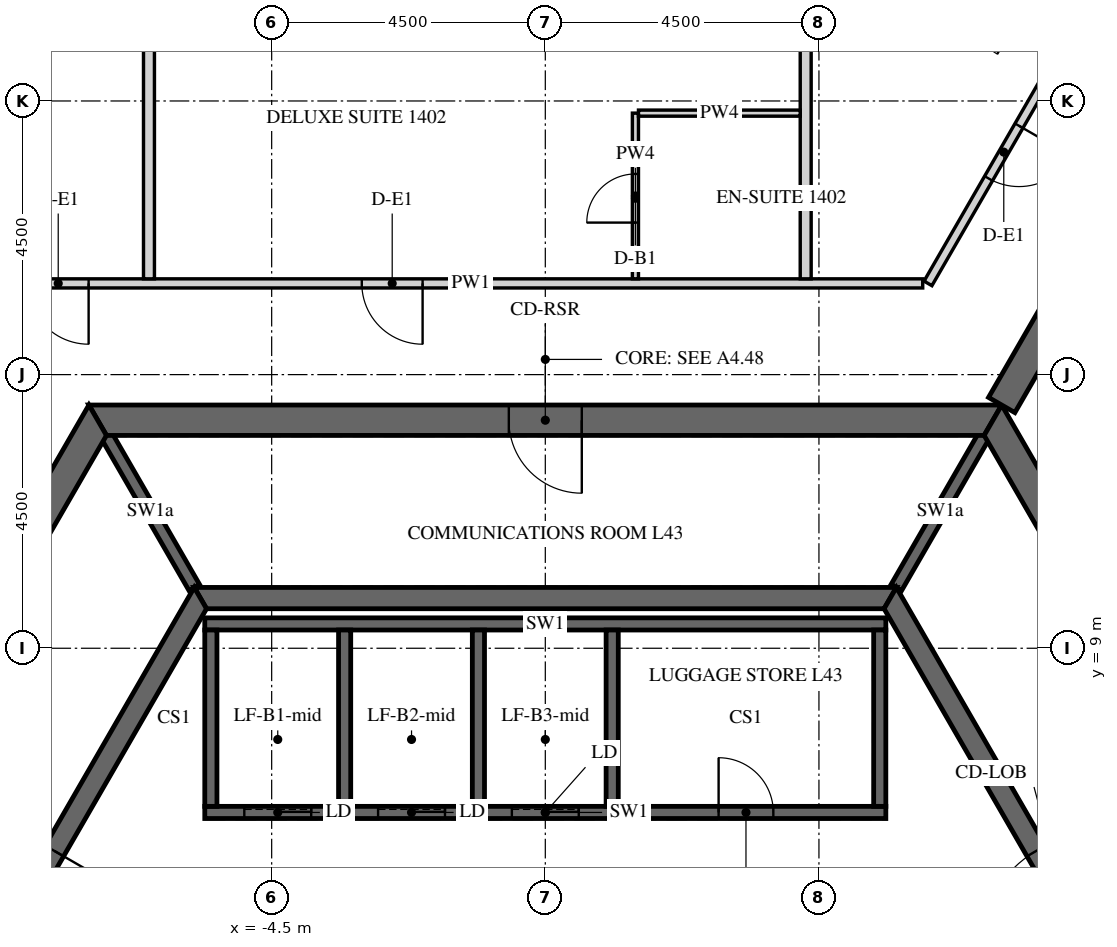
"""IFC4 building model, lengths in metres.
Left out: names, types, materials, properties, quantities, classifications, styles, units other than length and angle.
Written with IfcOpenShell. Run it as: python <this file> out.ifc"""

import sys

from ifc_helpers import new_model, si_unit, direction, frame, frame_2d, origin, place, context, subcontext, project, spatial, polyline, rectangle, outline, extrude, element, fill, save


model = new_model("IFC4")
c1 = context("Model", 3, precision=1e-05, world=origin(), true_north=direction((0.0, 1.0)))
c2 = subcontext(c1, "Body", "Model", "MODEL_VIEW")
j1 = project(units=[si_unit("LENGTHUNIT", "METRE"), si_unit("PLANEANGLEUNIT", "RADIAN")], contexts=[c1])
p1 = place(None, origin())
s1 = spatial("IfcSite", under=j1, at=p1, CompositionType="ELEMENT")
p2 = place(p1, origin())
s2 = spatial("IfcBuilding", under=s1, at=p2, CompositionType="ELEMENT")
p3 = place(p2, frame((0.0, 0.0, 183.9)))
s3 = spatial("IfcBuildingStorey", under=s2, at=p3, CompositionType="ELEMENT", Elevation=183.9)
p4 = place(p3, frame((-7.361, 12.75, -0.15), z_axis=(0.0, 0.0, 1.0), x_axis=(-0.50000571537, -0.866022103989, 0.0)))
e1 = element("IfcWall", 1, at=p4, inside=s3, PredefinedType="SHEAR", context=c2, shape_type="SweptSolid", body=[
    extrude(outline(polyline([(-0.144, -0.25), (14.867, -0.25), (14.578, 0.25), (0.144, 0.25), (-0.144, -0.25)])), origin(), (0.0, 0.0, 1.0), 3.9),
])
p5 = place(p4, frame((6.49, 0.0, 0.15)))
e2 = element("IfcOpeningElement", 2, at=p5, cuts=e1, PredefinedType="OPENING", context=c2, shape_type="SweptSolid", body=[
    extrude(rectangle(XDim=1.8, YDim=2.4, at=frame_2d((0.9, 1.2))), frame((0.0, 0.26, 0.0), z_axis=(0.0, -1.0, 0.0), x_axis=(1.0, 0.0, 0.0)), (0.0, 0.0, 1.0), 0.52),
])
p6 = place(p3, frame((14.722, 0.0, -0.15), z_axis=(0.0, 0.0, 1.0), x_axis=(-0.50000571537, 0.866022103989, 0.0)))
e3 = element("IfcWall", 3, at=p6, inside=s3, PredefinedType="SHEAR", context=c2, shape_type="SweptSolid", body=[
    extrude(outline(polyline([(-0.144, -0.25), (14.867, -0.25), (14.578, 0.25), (0.144, 0.25), (-0.144, -0.25)])), origin(), (0.0, 0.0, 1.0), 3.9),
])
p7 = place(p6, frame((6.432, 0.0, 0.15)))
e4 = element("IfcOpeningElement", 4, at=p7, cuts=e3, PredefinedType="OPENING", context=c2, shape_type="SweptSolid", body=[
    extrude(rectangle(XDim=1.8, YDim=2.4, at=frame_2d((0.9, 1.2))), frame((0.0, 0.26, 0.0), z_axis=(0.0, -1.0, 0.0), x_axis=(1.0, 0.0, 0.0)), (0.0, 0.0, 1.0), 0.52),
])
p8 = place(p3, frame((7.361, 12.75, -0.15), z_axis=(0.0, 0.0, 1.0), x_axis=(-1.0, 0.0, 0.0)))
e5 = element("IfcWall", 5, at=p8, inside=s3, PredefinedType="SHEAR", context=c2, shape_type="SweptSolid", body=[
    extrude(outline(polyline([(-0.144, -0.25), (14.866, -0.25), (14.578, 0.25), (0.144, 0.25), (-0.144, -0.25)])), origin(), (0.0, 0.0, 1.0), 3.9),
])
p9 = place(p8, frame((6.761, 0.0, 0.15)))
e6 = element("IfcOpeningElement", 6, at=p9, cuts=e5, PredefinedType="OPENING", context=c2, shape_type="SweptSolid", body=[
    extrude(rectangle(XDim=1.2, YDim=2.4, at=frame_2d((0.6, 1.2))), frame((0.0, 0.26, 0.0), z_axis=(0.0, -1.0, 0.0), x_axis=(1.0, 0.0, 0.0)), (0.0, 0.0, 1.0), 0.52),
])
p10 = place(p3, frame((7.506, 13.0, -0.15), z_axis=(0.0, 0.0, 1.0), x_axis=(0.499988271576, 0.866032175087, 0.0)))
e7 = element("IfcWall", 7, at=p10, inside=s3, PredefinedType="SHEAR", context=c2, shape_type="SweptSolid", body=[
    extrude(rectangle(XDim=15.424, YDim=0.5, at=frame_2d((7.712, 0.0))), origin(), (0.0, 0.0, 1.0), 3.9),
])
p11 = place(p10, frame((6.812, 0.0, 0.15)))
e8 = element("IfcOpeningElement", 8, at=p11, cuts=e7, PredefinedType="OPENING", context=c2, shape_type="SweptSolid", body=[
    extrude(rectangle(XDim=1.8, YDim=2.4, at=frame_2d((0.9, 1.2))), frame((0.0, 0.26, 0.0), z_axis=(0.0, -1.0, 0.0), x_axis=(1.0, 0.0, 0.0)), (0.0, 0.0, 1.0), 0.52),
])
p12 = place(p3, frame((-5.673, 9.825, -0.15), z_axis=(0.0, 0.0, 1.0), x_axis=(-0.499995046907, -0.866028263435, 0.0)))
e9 = element("IfcWall", 9, at=p12, inside=s3, PredefinedType="SHEAR", context=c2, shape_type="SweptSolid", body=[
    extrude(outline(polyline([(-0.101, -0.175), (11.446, -0.175), (11.244, 0.175), (0.101, 0.175), (-0.101, -0.175)])), origin(), (0.0, 0.0, 1.0), 3.9),
])
p13 = place(p12, frame((4.801, 0.0, 0.15)))
e10 = element("IfcOpeningElement", 10, at=p13, cuts=e9, PredefinedType="OPENING", context=c2, shape_type="SweptSolid", body=[
    extrude(rectangle(XDim=1.8, YDim=2.4, at=frame_2d((0.9, 1.2))), frame((0.0, 0.185, 0.0), z_axis=(0.0, -1.0, 0.0), x_axis=(1.0, 0.0, 0.0)), (0.0, 0.0, 1.0), 0.37),
])
p14 = place(p3, frame((11.345, 0.0, -0.15), z_axis=(0.0, 0.0, 1.0), x_axis=(-0.499995046907, 0.866028263435, 0.0)))
e11 = element("IfcWall", 11, at=p14, inside=s3, PredefinedType="SHEAR", context=c2, shape_type="SweptSolid", body=[
    extrude(outline(polyline([(-0.101, -0.175), (11.446, -0.175), (11.244, 0.175), (0.101, 0.175), (-0.101, -0.175)])), origin(), (0.0, 0.0, 1.0), 3.9),
])
p15 = place(p14, frame((4.744, 0.0, 0.15)))
e12 = element("IfcOpeningElement", 12, at=p15, cuts=e11, PredefinedType="OPENING", context=c2, shape_type="SweptSolid", body=[
    extrude(rectangle(XDim=1.8, YDim=2.4, at=frame_2d((0.9, 1.2))), frame((0.0, 0.185, 0.0), z_axis=(0.0, -1.0, 0.0), x_axis=(1.0, 0.0, 0.0)), (0.0, 0.0, 1.0), 0.37),
])
p16 = place(p3, frame((5.673, 9.825, -0.15), z_axis=(0.0, 0.0, 1.0), x_axis=(-1.0, 0.0, 0.0)))
e13 = element("IfcWall", 13, at=p16, inside=s3, PredefinedType="SHEAR", context=c2, shape_type="SweptSolid", body=[
    extrude(outline(polyline([(-0.101, -0.175), (11.446, -0.175), (11.244, 0.175), (0.101, 0.175), (-0.101, -0.175)])), origin(), (0.0, 0.0, 1.0), 3.9),
])
p17 = place(p3, frame((-5.6, 6.3, -0.25), z_axis=(0.0, 0.0, 1.0), x_axis=(1.0, 0.0, 0.0)))
e14 = element("IfcWall", 14, at=p17, inside=s3, PredefinedType="SHEAR", context=c2, shape_type="SweptSolid", body=[
    extrude(rectangle(XDim=11.2, YDim=0.2, at=frame_2d((5.6, 0.0))), origin(), (0.0, 0.0, 1.0), 3.9),
])
p18 = place(p17, frame((8.45, 0.0, 0.25)))
e15 = element("IfcOpeningElement", 15, at=p18, cuts=e14, PredefinedType="OPENING", context=c2, shape_type="SweptSolid", body=[
    extrude(rectangle(XDim=0.9, YDim=2.1, at=frame_2d((0.45, 1.05))), frame((0.0, 0.11, 0.0), z_axis=(0.0, -1.0, 0.0), x_axis=(1.0, 0.0, 0.0)), (0.0, 0.0, 1.0), 0.22),
])
p19 = place(p17, frame((0.65, 0.0, 0.25)))
e16 = element("IfcOpeningElement", 16, at=p19, cuts=e14, PredefinedType="OPENING", context=c2, shape_type="SweptSolid", body=[
    extrude(rectangle(XDim=1.1, YDim=2.1, at=frame_2d((0.55, 1.05))), frame((0.0, 0.11, 0.0), z_axis=(0.0, -1.0, 0.0), x_axis=(1.0, 0.0, 0.0)), (0.0, 0.0, 1.0), 0.22),
])
p20 = place(p17, frame((2.85, 0.0, 0.25)))
e17 = element("IfcOpeningElement", 17, at=p20, cuts=e14, PredefinedType="OPENING", context=c2, shape_type="SweptSolid", body=[
    extrude(rectangle(XDim=1.1, YDim=2.1, at=frame_2d((0.55, 1.05))), frame((0.0, 0.11, 0.0), z_axis=(0.0, -1.0, 0.0), x_axis=(1.0, 0.0, 0.0)), (0.0, 0.0, 1.0), 0.22),
])
p21 = place(p17, frame((5.05, 0.0, 0.25)))
e18 = element("IfcOpeningElement", 18, at=p21, cuts=e14, PredefinedType="OPENING", context=c2, shape_type="SweptSolid", body=[
    extrude(rectangle(XDim=1.1, YDim=2.1, at=frame_2d((0.55, 1.05))), frame((0.0, 0.11, 0.0), z_axis=(0.0, -1.0, 0.0), x_axis=(1.0, 0.0, 0.0)), (0.0, 0.0, 1.0), 0.22),
])
p22 = place(p3, frame((-5.6, 9.4, -0.25), z_axis=(0.0, 0.0, 1.0), x_axis=(1.0, 0.0, 0.0)))
e19 = element("IfcWall", 19, at=p22, inside=s3, PredefinedType="SHEAR", context=c2, shape_type="SweptSolid", body=[
    extrude(rectangle(XDim=11.2, YDim=0.2, at=frame_2d((5.6, 0.0))), origin(), (0.0, 0.0, 1.0), 3.9),
])
for number, where, z_axis, x_axis in (
    (20, (-5.5, 6.4, -0.25), (0.0, 0.0, 1.0), (0.0, 1.0, 0.0)),
    (21, (-3.3, 6.4, -0.25), (0.0, 0.0, 1.0), (0.0, 1.0, 0.0)),
    (22, (-1.1, 6.4, -0.25), (0.0, 0.0, 1.0), (0.0, 1.0, 0.0)),
    (23, (1.1, 6.4, -0.25), (0.0, 0.0, 1.0), (0.0, 1.0, 0.0)),
    (24, (5.5, 6.4, -0.25), (0.0, 0.0, 1.0), (0.0, 1.0, 0.0)),
):
    element("IfcWall", number, at=place(p3, frame(where, z_axis=z_axis, x_axis=x_axis)), inside=s3, PredefinedType="SHEAR", context=c2, shape_type="SweptSolid", body=[
        extrude(rectangle(XDim=2.9, YDim=0.2, at=frame_2d((1.45, 0.0))), origin(), (0.0, 0.0, 1.0), 3.9),
    ])
for number, where, z_axis, x_axis in (
    (25, (5.773, 10.0, -0.15), (0.0, 0.0, 1.0), (0.5, 0.866, 0.0)),
    (26, (-5.773, 10.0, -0.15), (0.0, 0.0, 1.0), (-0.5, 0.866, 0.0)),
):
    element("IfcWall", number, at=place(p3, frame(where, z_axis=z_axis, x_axis=x_axis)), inside=s3, PredefinedType="SHEAR", context=c2, shape_type="SweptSolid", body=[
        extrude(rectangle(XDim=2.887, YDim=0.2, at=frame_2d((1.443, 0.0))), origin(), (0.0, 0.0, 1.0), 3.9),
    ])
p23 = place(p3, frame((10.149, 21.678, 0.0), z_axis=(0.0, 0.0, 1.0), x_axis=(-0.499993780622, -0.866028994514, 0.0)))
e27 = element("IfcWall", 27, at=p23, inside=s3, PredefinedType="PARTITIONING", context=c2, shape_type="SweptSolid", body=[
    extrude(rectangle(XDim=7.711, YDim=0.15, at=frame_2d((3.855, 0.0))), origin(), (0.0, 0.0, 1.0), 2.988),
])
p24 = place(p23, frame((4.718, 0.0, 0.0)))
e28 = element("IfcOpeningElement", 28, at=p24, cuts=e27, PredefinedType="OPENING", context=c2, shape_type="SweptSolid", body=[
    extrude(rectangle(XDim=1.0, YDim=2.1, at=frame_2d((0.5, 1.05))), frame((0.0, 0.085, 0.0), z_axis=(0.0, -1.0, 0.0), x_axis=(1.0, 0.0, 0.0)), (0.0, 0.0, 1.0), 0.17),
])
p25 = place(p3, frame((6.207, 15.0, 0.0), z_axis=(0.0, 0.0, 1.0), x_axis=(-1.0, 0.0, 0.0)))
e29 = element("IfcWall", 29, at=p25, inside=s3, PredefinedType="PARTITIONING", context=c2, shape_type="SweptSolid", body=[
    extrude(rectangle(XDim=14.867, YDim=0.15, at=frame_2d((7.433, 0.0))), origin(), (0.0, 0.0, 1.0), 2.988),
])
p26 = place(p25, frame((8.224, 0.0, 0.0)))
e30 = element("IfcOpeningElement", 30, at=p26, cuts=e29, PredefinedType="OPENING", context=c2, shape_type="SweptSolid", body=[
    extrude(rectangle(XDim=1.0, YDim=2.1, at=frame_2d((0.5, 1.05))), frame((0.0, 0.085, 0.0), z_axis=(0.0, -1.0, 0.0), x_axis=(1.0, 0.0, 0.0)), (0.0, 0.0, 1.0), 0.17),
])
p27 = place(p25, frame((13.717, 0.0, 0.0)))
e31 = element("IfcOpeningElement", 31, at=p27, cuts=e29, PredefinedType="OPENING", context=c2, shape_type="SweptSolid", body=[
    extrude(rectangle(XDim=1.0, YDim=2.1, at=frame_2d((0.5, 1.05))), frame((0.0, 0.085, 0.0), z_axis=(0.0, -1.0, 0.0), x_axis=(1.0, 0.0, 0.0)), (0.0, 0.0, 1.0), 0.17),
])
p28 = place(p3, frame((4.282, 27.45, 0.0), z_axis=(0.0, 0.0, 1.0), x_axis=(0.0, -1.0, 0.0)))
e32 = element("IfcWall", 32, at=p28, inside=s3, PredefinedType="PARTITIONING", context=c2, shape_type="SweptSolid", body=[
    extrude(rectangle(XDim=12.375, YDim=0.18, at=frame_2d((6.188, 0.0))), origin(), (0.0, 0.0, 1.0), 2.988),
])
p29 = place(p3, frame((1.482, 15.075, 0.0), z_axis=(0.0, 0.0, 1.0), x_axis=(0.0, 1.0, 0.0)))
e33 = element("IfcWall", 33, at=p29, inside=s3, PredefinedType="PARTITIONING", context=c2, shape_type="SweptSolid", body=[
    extrude(rectangle(XDim=2.725, YDim=0.1, at=frame_2d((1.363, 0.0))), origin(), (0.0, 0.0, 1.0), 2.988),
])
p30 = place(p29, frame((0.925, 0.0, 0.0)))
e34 = element("IfcOpeningElement", 34, at=p30, cuts=e33, PredefinedType="OPENING", context=c2, shape_type="SweptSolid", body=[
    extrude(rectangle(XDim=0.8, YDim=2.1, at=frame_2d((0.4, 1.05))), frame((0.0, 0.06, 0.0), z_axis=(0.0, -1.0, 0.0), x_axis=(1.0, 0.0, 0.0)), (0.0, 0.0, 1.0), 0.12),
])
p31 = place(p3, frame((1.532, 17.8, 0.0), z_axis=(0.0, 0.0, 1.0), x_axis=(1.0, 0.0, 0.0)))
e35 = element("IfcWall", 35, at=p31, inside=s3, PredefinedType="PARTITIONING", context=c2, shape_type="SweptSolid", body=[
    extrude(rectangle(XDim=2.66, YDim=0.1, at=frame_2d((1.33, 0.0))), origin(), (0.0, 0.0, 1.0), 2.988),
])
p32 = place(p3, frame((-6.518, 27.45, 0.0), z_axis=(0.0, 0.0, 1.0), x_axis=(0.0, -1.0, 0.0)))
e36 = element("IfcWall", 36, at=p32, inside=s3, PredefinedType="PARTITIONING", context=c2, shape_type="SweptSolid", body=[
    extrude(rectangle(XDim=12.375, YDim=0.18, at=frame_2d((6.188, 0.0))), origin(), (0.0, 0.0, 1.0), 2.988),
])
p33 = place(p9, origin())
e37 = element("IfcDoor", 37, at=p33, inside=s3, OperationType="SINGLE_SWING_LEFT", PredefinedType="DOOR", context=c2, shape_type="SweptSolid", body=[
    extrude(rectangle(XDim=1.2, YDim=2.4, at=frame_2d((0.6, 1.2))), frame((0.0, 0.025, 0.0), z_axis=(0.0, -1.0, 0.0), x_axis=(1.0, 0.0, 0.0)), (0.0, 0.0, 1.0), 0.05),
])
fill(e6, e37)
p34 = place(p13, origin())
e38 = element("IfcDoor", 38, at=p34, inside=s3, OperationType="DOUBLE_DOOR_SINGLE_SWING", PredefinedType="DOOR", context=c2, shape_type="SweptSolid", body=[
    extrude(rectangle(XDim=1.8, YDim=2.4, at=frame_2d((0.9, 1.2))), frame((0.0, 0.025, 0.0), z_axis=(0.0, -1.0, 0.0), x_axis=(1.0, 0.0, 0.0)), (0.0, 0.0, 1.0), 0.05),
])
fill(e10, e38)
p35 = place(p15, origin())
e39 = element("IfcDoor", 39, at=p35, inside=s3, OperationType="DOUBLE_DOOR_SINGLE_SWING", PredefinedType="DOOR", context=c2, shape_type="SweptSolid", body=[
    extrude(rectangle(XDim=1.8, YDim=2.4, at=frame_2d((0.9, 1.2))), frame((0.0, 0.025, 0.0), z_axis=(0.0, -1.0, 0.0), x_axis=(1.0, 0.0, 0.0)), (0.0, 0.0, 1.0), 0.05),
])
fill(e12, e39)
p36 = place(p18, origin())
e40 = element("IfcDoor", 40, at=p36, inside=s3, OperationType="SINGLE_SWING_LEFT", PredefinedType="DOOR", context=c2, shape_type="SweptSolid", body=[
    extrude(rectangle(XDim=0.9, YDim=2.1, at=frame_2d((0.45, 1.05))), frame((0.0, 0.025, 0.0), z_axis=(0.0, -1.0, 0.0), x_axis=(1.0, 0.0, 0.0)), (0.0, 0.0, 1.0), 0.05),
])
fill(e15, e40)
p37 = place(p19, origin())
e41 = element("IfcDoor", 41, at=p37, inside=s3, OperationType="SLIDING_TO_LEFT", PredefinedType="DOOR", context=c2, shape_type="SweptSolid", body=[
    extrude(rectangle(XDim=1.1, YDim=2.1, at=frame_2d((0.55, 1.05))), frame((0.0, 0.025, 0.0), z_axis=(0.0, -1.0, 0.0), x_axis=(1.0, 0.0, 0.0)), (0.0, 0.0, 1.0), 0.05),
])
fill(e16, e41)
p38 = place(p20, origin())
e42 = element("IfcDoor", 42, at=p38, inside=s3, OperationType="SLIDING_TO_LEFT", PredefinedType="DOOR", context=c2, shape_type="SweptSolid", body=[
    extrude(rectangle(XDim=1.1, YDim=2.1, at=frame_2d((0.55, 1.05))), frame((0.0, 0.025, 0.0), z_axis=(0.0, -1.0, 0.0), x_axis=(1.0, 0.0, 0.0)), (0.0, 0.0, 1.0), 0.05),
])
fill(e17, e42)
p39 = place(p21, origin())
e43 = element("IfcDoor", 43, at=p39, inside=s3, OperationType="SLIDING_TO_LEFT", PredefinedType="DOOR", context=c2, shape_type="SweptSolid", body=[
    extrude(rectangle(XDim=1.1, YDim=2.1, at=frame_2d((0.55, 1.05))), frame((0.0, 0.025, 0.0), z_axis=(0.0, -1.0, 0.0), x_axis=(1.0, 0.0, 0.0)), (0.0, 0.0, 1.0), 0.05),
])
fill(e18, e43)
p40 = place(p24, origin())
e44 = element("IfcDoor", 44, at=p40, inside=s3, OperationType="SINGLE_SWING_LEFT", PredefinedType="DOOR", context=c2, shape_type="SweptSolid", body=[
    extrude(rectangle(XDim=1.0, YDim=2.1, at=frame_2d((0.5, 1.05))), frame((0.0, 0.025, 0.0), z_axis=(0.0, -1.0, 0.0), x_axis=(1.0, 0.0, 0.0)), (0.0, 0.0, 1.0), 0.05),
])
fill(e28, e44)
p41 = place(p26, origin())
e45 = element("IfcDoor", 45, at=p41, inside=s3, OperationType="SINGLE_SWING_RIGHT", PredefinedType="DOOR", context=c2, shape_type="SweptSolid", body=[
    extrude(rectangle(XDim=1.0, YDim=2.1, at=frame_2d((0.5, 1.05))), frame((0.0, 0.025, 0.0), z_axis=(0.0, -1.0, 0.0), x_axis=(1.0, 0.0, 0.0)), (0.0, 0.0, 1.0), 0.05),
])
fill(e30, e45)
p42 = place(p30, origin())
e46 = element("IfcDoor", 46, at=p42, inside=s3, OperationType="SINGLE_SWING_RIGHT", PredefinedType="DOOR", context=c2, shape_type="SweptSolid", body=[
    extrude(rectangle(XDim=0.8, YDim=2.1, at=frame_2d((0.4, 1.05))), frame((0.0, 0.025, 0.0), z_axis=(0.0, -1.0, 0.0), x_axis=(1.0, 0.0, 0.0)), (0.0, 0.0, 1.0), 0.05),
])
fill(e34, e46)
p43 = place(p27, origin())
e47 = element("IfcDoor", 47, at=p43, inside=s3, OperationType="SINGLE_SWING_LEFT", PredefinedType="DOOR", context=c2, shape_type="SweptSolid", body=[
    extrude(rectangle(XDim=1.0, YDim=2.1, at=frame_2d((0.5, 1.05))), frame((0.0, 0.025, 0.0), z_axis=(0.0, -1.0, 0.0), x_axis=(1.0, 0.0, 0.0)), (0.0, 0.0, 1.0), 0.05),
])
fill(e31, e47)
save(model, sys.argv[1])
